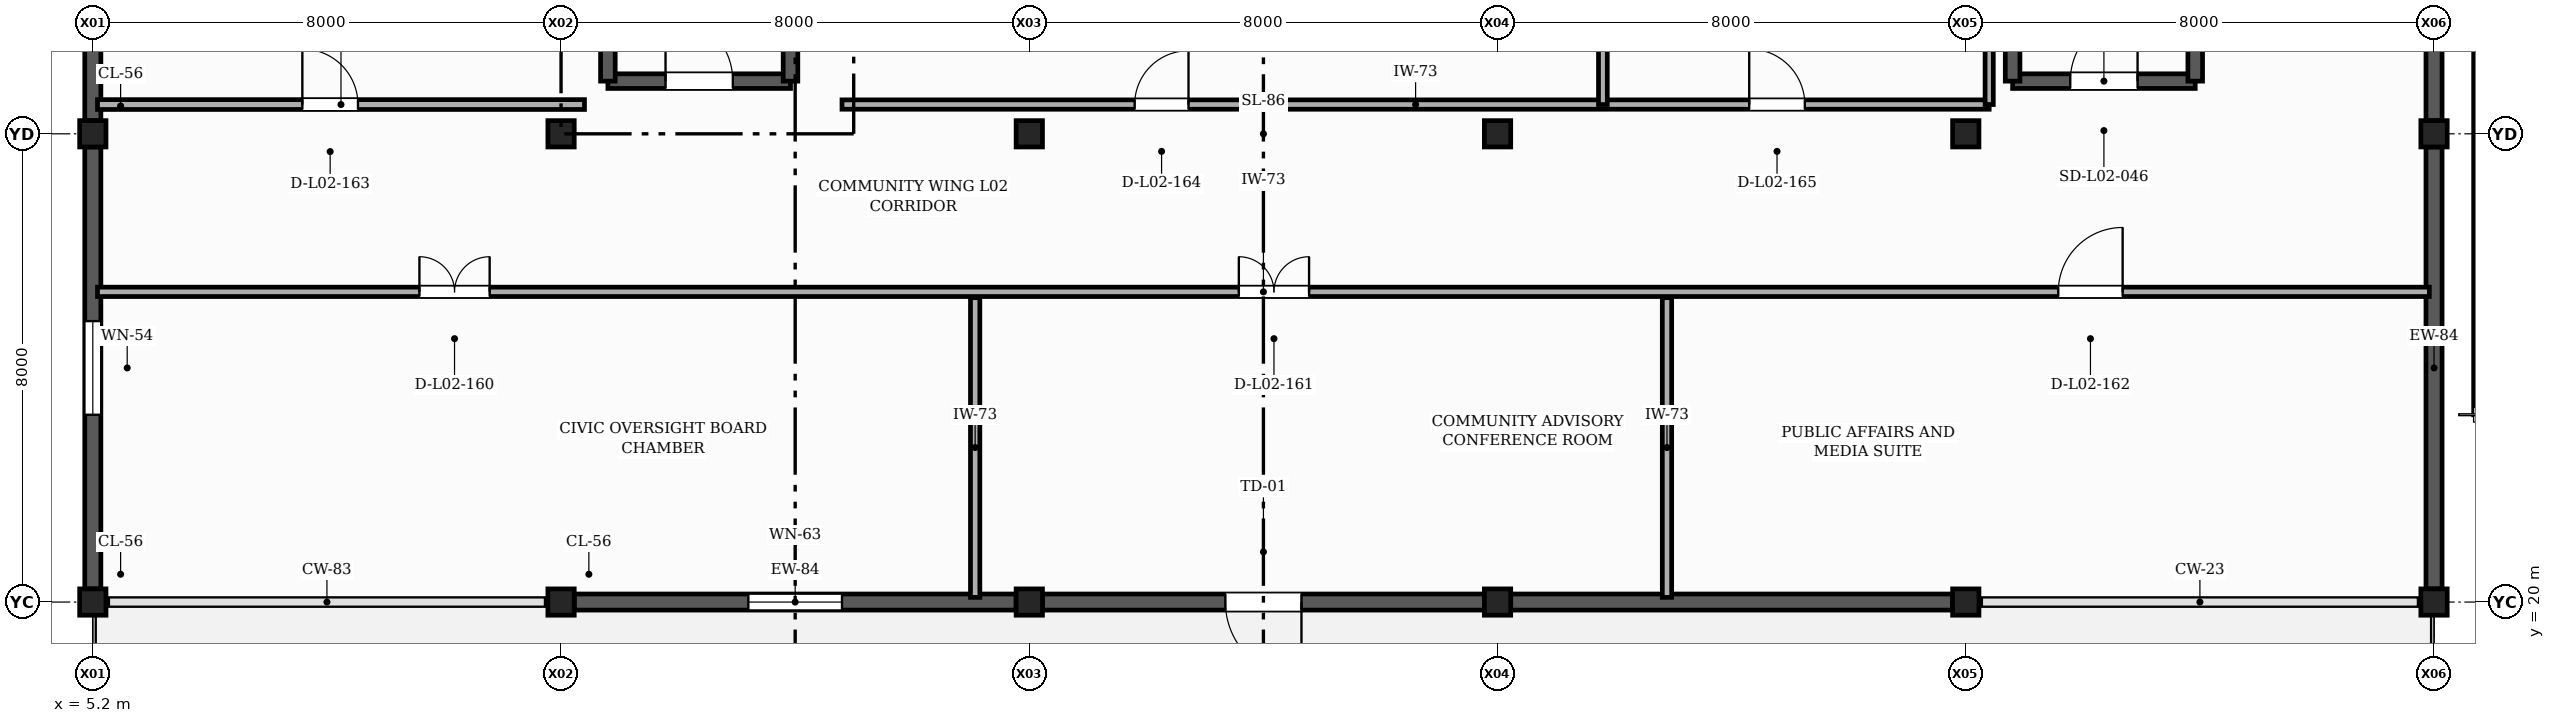
"""IFC4 building model, lengths in metres.
Left out: names, types, materials, properties, quantities, classifications, styles, units other than length and angle.
Written with IfcOpenShell. Run it as: python <this file> out.ifc"""

import sys

from ifc_helpers import new_model, si_unit, direction, frame, frame_2d, origin, origin_2d, place, context, subcontext, project, spatial, rectangle, extrude, element, fill, save


model = new_model("IFC4")
c1 = context("Model", 3, precision=1e-05, world=origin(), true_north=direction((0.0, 1.0)))
c2 = subcontext(c1, "Body", "Model", "MODEL_VIEW")
j1 = project(units=[si_unit("LENGTHUNIT", "METRE"), si_unit("PLANEANGLEUNIT", "RADIAN")], contexts=[c1])
p1 = place(None, origin())
s1 = spatial("IfcSite", under=j1, at=p1, CompositionType="ELEMENT")
p2 = place(p1, origin())
s2 = spatial("IfcBuilding", under=s1, at=p2, CompositionType="ELEMENT")
p3 = place(p2, frame((0.0, 0.0, 9.0)))
s3 = spatial("IfcBuildingStorey", under=s2, at=p3, CompositionType="ELEMENT", Elevation=9.0)
for number, where, z_axis, x_axis in (
    (1, (5.2, 20.0, 0.0), (0.0, 0.0, 1.0), (1.0, 0.0, 0.0)),
    (2, (5.2, 28.0, 0.0), (0.0, 0.0, 1.0), (1.0, 0.0, 0.0)),
    (3, (13.2, 20.0, 0.0), (0.0, 0.0, 1.0), (1.0, 0.0, 0.0)),
    (4, (13.2, 28.0, 0.0), (0.0, 0.0, 1.0), (1.0, 0.0, 0.0)),
    (5, (21.2, 20.0, 0.0), (0.0, 0.0, 1.0), (1.0, 0.0, 0.0)),
    (6, (21.2, 28.0, 0.0), (0.0, 0.0, 1.0), (1.0, 0.0, 0.0)),
    (7, (29.2, 20.0, 0.0), (0.0, 0.0, 1.0), (1.0, 0.0, 0.0)),
    (8, (29.2, 28.0, 0.0), (0.0, 0.0, 1.0), (1.0, 0.0, 0.0)),
    (9, (37.2, 20.0, 0.0), (0.0, 0.0, 1.0), (1.0, 0.0, 0.0)),
    (10, (37.2, 28.0, 0.0), (0.0, 0.0, 1.0), (1.0, 0.0, 0.0)),
    (11, (45.2, 20.0, 0.0), (0.0, 0.0, 1.0), (1.0, 0.0, 0.0)),
    (12, (45.2, 28.0, 0.0), (0.0, 0.0, 1.0), (1.0, 0.0, 0.0)),
):
    element("IfcColumn", number, at=place(p3, frame(where, z_axis=z_axis, x_axis=x_axis)), inside=s3, PredefinedType="COLUMN", context=c2, shape_type="SweptSolid", body=[
        extrude(rectangle(XDim=0.45, YDim=0.45, at=origin_2d()), origin(), (0.0, 0.0, 1.0), 4.5),
    ])
p4 = place(p3, frame((46.0, 35.575, 0.0), z_axis=(0.0, 0.0, 1.0), x_axis=(0.0, -1.0, 0.0)))
e13 = element("IfcWall", 13, at=p4, inside=s3, PredefinedType="SOLIDWALL", context=c2, shape_type="SweptSolid", body=[
    extrude(rectangle(XDim=12.375, YDim=0.245, at=frame_2d((6.188, 0.0))), origin(), (0.0, 0.0, 1.0), 3.22),
])
p5 = place(p3, frame((13.425, 20.0, 0.0), z_axis=(0.0, 0.0, 1.0), x_axis=(1.0, 0.0, 0.0)))
e14 = element("IfcWall", 14, at=p5, inside=s3, PredefinedType="SOLIDWALL", context=c2, shape_type="SweptSolid", body=[
    extrude(rectangle(XDim=7.55, YDim=0.275, at=frame_2d((3.775, 0.0))), origin(), (0.0, 0.0, 1.0), 3.57),
])
p6 = place(p5, frame((2.975, 0.0, 0.9)))
e15 = element("IfcOpeningElement", 15, at=p6, cuts=e14, PredefinedType="OPENING", context=c2, shape_type="SweptSolid", body=[
    extrude(rectangle(XDim=1.6, YDim=1.25, at=frame_2d((0.8, 0.625))), frame((0.0, 0.147, 0.0), z_axis=(0.0, -1.0, 0.0), x_axis=(1.0, 0.0, 0.0)), (0.0, 0.0, 1.0), 0.295),
])
p7 = place(p3, frame((21.425, 20.0, 0.0), z_axis=(0.0, 0.0, 1.0), x_axis=(1.0, 0.0, 0.0)))
e16 = element("IfcWall", 16, at=p7, inside=s3, PredefinedType="SOLIDWALL", context=c2, shape_type="SweptSolid", body=[
    extrude(rectangle(XDim=7.55, YDim=0.275, at=frame_2d((3.775, 0.0))), origin(), (0.0, 0.0, 1.0), 3.57),
])
p8 = place(p7, frame((3.125, 0.0, 0.0)))
e17 = element("IfcOpeningElement", 17, at=p8, cuts=e16, PredefinedType="OPENING", context=c2, shape_type="SweptSolid", body=[
    extrude(rectangle(XDim=1.3, YDim=2.2, at=frame_2d((0.65, 1.1))), frame((0.0, 0.147, 0.0), z_axis=(0.0, -1.0, 0.0), x_axis=(1.0, 0.0, 0.0)), (0.0, 0.0, 1.0), 0.295),
])
p9 = place(p3, frame((29.425, 20.0, 0.0), z_axis=(0.0, 0.0, 1.0), x_axis=(1.0, 0.0, 0.0)))
e18 = element("IfcWall", 18, at=p9, inside=s3, PredefinedType="SOLIDWALL", context=c2, shape_type="SweptSolid", body=[
    extrude(rectangle(XDim=7.55, YDim=0.275, at=frame_2d((3.775, 0.0))), origin(), (0.0, 0.0, 1.0), 3.57),
])
for number, where, z_axis, x_axis in (
    (19, (45.2, 20.225, 0.0), (0.0, 0.0, 1.0), (0.0, 1.0, 0.0)),
    (20, (45.2, 28.225, 0.0), (0.0, 0.0, 1.0), (0.0, 1.0, 0.0)),
):
    element("IfcWall", number, at=place(p3, frame(where, z_axis=z_axis, x_axis=x_axis)), inside=s3, PredefinedType="SOLIDWALL", context=c2, shape_type="SweptSolid", body=[
        extrude(rectangle(XDim=7.55, YDim=0.275, at=frame_2d((3.775, 0.0))), origin(), (0.0, 0.0, 1.0), 3.57),
    ])
p10 = place(p3, frame((5.2, 35.775, 0.0), z_axis=(0.0, 0.0, 1.0), x_axis=(0.0, -1.0, 0.0)))
e21 = element("IfcWall", 21, at=p10, inside=s3, PredefinedType="SOLIDWALL", context=c2, shape_type="SweptSolid", body=[
    extrude(rectangle(XDim=7.55, YDim=0.275, at=frame_2d((3.775, 0.0))), origin(), (0.0, 0.0, 1.0), 3.57),
])
p11 = place(p10, frame((2.975, 0.0, 0.9)))
e22 = element("IfcOpeningElement", 22, at=p11, cuts=e21, PredefinedType="OPENING", context=c2, shape_type="SweptSolid", body=[
    extrude(rectangle(XDim=1.6, YDim=2.1, at=frame_2d((0.8, 1.05))), frame((0.0, 0.147, 0.0), z_axis=(0.0, -1.0, 0.0), x_axis=(1.0, 0.0, 0.0)), (0.0, 0.0, 1.0), 0.295),
])
p12 = place(p3, frame((5.2, 27.775, 0.0), z_axis=(0.0, 0.0, 1.0), x_axis=(0.0, -1.0, 0.0)))
e23 = element("IfcWall", 23, at=p12, inside=s3, PredefinedType="SOLIDWALL", context=c2, shape_type="SweptSolid", body=[
    extrude(rectangle(XDim=7.55, YDim=0.275, at=frame_2d((3.775, 0.0))), origin(), (0.0, 0.0, 1.0), 3.57),
])
p13 = place(p12, frame((2.975, 0.0, 0.9)))
e24 = element("IfcOpeningElement", 24, at=p13, cuts=e23, PredefinedType="OPENING", context=c2, shape_type="SweptSolid", body=[
    extrude(rectangle(XDim=1.6, YDim=2.1, at=frame_2d((0.8, 1.05))), frame((0.0, 0.147, 0.0), z_axis=(0.0, -1.0, 0.0), x_axis=(1.0, 0.0, 0.0)), (0.0, 0.0, 1.0), 0.295),
])
p14 = place(p3, frame((14.0, 28.9, 0.0), z_axis=(0.0, 0.0, 1.0), x_axis=(1.0, 0.0, 0.0)))
e25 = element("IfcWall", 25, at=p14, inside=s3, PredefinedType="SHEAR", context=c2, shape_type="SweptSolid", body=[
    extrude(rectangle(XDim=3.12, YDim=0.25, at=frame_2d((1.56, 0.0))), origin(), (0.0, 0.0, 1.0), 4.5),
])
p15 = place(p14, frame((0.985, 0.0, 0.0)))
e26 = element("IfcOpeningElement", 26, at=p15, cuts=e25, PredefinedType="OPENING", context=c2, shape_type="SweptSolid", body=[
    extrude(rectangle(XDim=1.15, YDim=2.15, at=frame_2d((0.575, 1.075))), frame((0.0, 0.135, 0.0), z_axis=(0.0, -1.0, 0.0), x_axis=(1.0, 0.0, 0.0)), (0.0, 0.0, 1.0), 0.27),
])
for number, where, z_axis, x_axis in (
    (27, (17.12, 28.9, 0.0), (0.0, 0.0, 1.0), (0.0, 1.0, 0.0)),
    (28, (14.0, 36.0, 0.0), (0.0, 0.0, 1.0), (0.0, -1.0, 0.0)),
):
    element("IfcWall", number, at=place(p3, frame(where, z_axis=z_axis, x_axis=x_axis)), inside=s3, PredefinedType="SHEAR", context=c2, shape_type="SweptSolid", body=[
        extrude(rectangle(XDim=7.1, YDim=0.25, at=frame_2d((3.55, 0.0))), origin(), (0.0, 0.0, 1.0), 4.5),
    ])
p16 = place(p3, frame((38.0, 28.9, 0.0), z_axis=(0.0, 0.0, 1.0), x_axis=(1.0, 0.0, 0.0)))
e29 = element("IfcWall", 29, at=p16, inside=s3, PredefinedType="SHEAR", context=c2, shape_type="SweptSolid", body=[
    extrude(rectangle(XDim=3.12, YDim=0.25, at=frame_2d((1.56, 0.0))), origin(), (0.0, 0.0, 1.0), 4.5),
])
p17 = place(p16, frame((0.985, 0.0, 0.0)))
e30 = element("IfcOpeningElement", 30, at=p17, cuts=e29, PredefinedType="OPENING", context=c2, shape_type="SweptSolid", body=[
    extrude(rectangle(XDim=1.15, YDim=2.15, at=frame_2d((0.575, 1.075))), frame((0.0, 0.135, 0.0), z_axis=(0.0, -1.0, 0.0), x_axis=(1.0, 0.0, 0.0)), (0.0, 0.0, 1.0), 0.27),
])
for number, where, z_axis, x_axis in (
    (31, (41.12, 28.9, 0.0), (0.0, 0.0, 1.0), (0.0, 1.0, 0.0)),
    (32, (38.0, 36.0, 0.0), (0.0, 0.0, 1.0), (0.0, -1.0, 0.0)),
):
    element("IfcWall", number, at=place(p3, frame(where, z_axis=z_axis, x_axis=x_axis)), inside=s3, PredefinedType="SHEAR", context=c2, shape_type="SweptSolid", body=[
        extrude(rectangle(XDim=7.1, YDim=0.25, at=frame_2d((3.55, 0.0))), origin(), (0.0, 0.0, 1.0), 4.5),
    ])
for number, where, z_axis, x_axis in (
    (33, (20.275, 20.08, 0.0), (0.0, 0.0, 1.0), (0.0, 1.0, 0.0)),
    (34, (32.095, 20.08, 0.0), (0.0, 0.0, 1.0), (0.0, 1.0, 0.0)),
):
    element("IfcWall", number, at=place(p3, frame(where, z_axis=z_axis, x_axis=x_axis)), inside=s3, PredefinedType="PARTITIONING", context=c2, shape_type="SweptSolid", body=[
        extrude(rectangle(XDim=5.12, YDim=0.16, at=frame_2d((2.56, 0.0))), origin(), (0.0, 0.0, 1.0), 3.555),
    ])
p18 = place(p3, frame((5.28, 25.3, 0.0), z_axis=(0.0, 0.0, 1.0), x_axis=(1.0, 0.0, 0.0)))
e35 = element("IfcWall", 35, at=p18, inside=s3, PredefinedType="PARTITIONING", context=c2, shape_type="SweptSolid", body=[
    extrude(rectangle(XDim=39.84, YDim=0.16, at=frame_2d((19.92, 0.0))), origin(), (0.0, 0.0, 1.0), 3.455),
])
p19 = place(p18, frame((5.5, 0.0, 0.0)))
e36 = element("IfcOpeningElement", 36, at=p19, cuts=e35, PredefinedType="OPENING", context=c2, shape_type="SweptSolid", body=[
    extrude(rectangle(XDim=1.2, YDim=2.2, at=frame_2d((0.6, 1.1))), frame((0.0, 0.09, 0.0), z_axis=(0.0, -1.0, 0.0), x_axis=(1.0, 0.0, 0.0)), (0.0, 0.0, 1.0), 0.18),
])
p20 = place(p18, frame((19.5, 0.0, 0.0)))
e37 = element("IfcOpeningElement", 37, at=p20, cuts=e35, PredefinedType="OPENING", context=c2, shape_type="SweptSolid", body=[
    extrude(rectangle(XDim=1.2, YDim=2.2, at=frame_2d((0.6, 1.1))), frame((0.0, 0.09, 0.0), z_axis=(0.0, -1.0, 0.0), x_axis=(1.0, 0.0, 0.0)), (0.0, 0.0, 1.0), 0.18),
])
p21 = place(p18, frame((33.5, 0.0, 0.0)))
e38 = element("IfcOpeningElement", 38, at=p21, cuts=e35, PredefinedType="OPENING", context=c2, shape_type="SweptSolid", body=[
    extrude(rectangle(XDim=1.1, YDim=2.1, at=frame_2d((0.55, 1.05))), frame((0.0, 0.09, 0.0), z_axis=(0.0, -1.0, 0.0), x_axis=(1.0, 0.0, 0.0)), (0.0, 0.0, 1.0), 0.18),
])
p22 = place(p3, frame((5.28, 28.5, 0.0), z_axis=(0.0, 0.0, 1.0), x_axis=(1.0, 0.0, 0.0)))
e39 = element("IfcWall", 39, at=p22, inside=s3, PredefinedType="PARTITIONING", context=c2, shape_type="SweptSolid", body=[
    extrude(rectangle(XDim=8.32, YDim=0.168, at=frame_2d((4.16, 0.0))), origin(), (0.0, 0.0, 1.0), 3.555),
])
p23 = place(p22, frame((3.5, 0.0, 0.0)))
e40 = element("IfcOpeningElement", 40, at=p23, cuts=e39, PredefinedType="OPENING", context=c2, shape_type="SweptSolid", body=[
    extrude(rectangle(XDim=0.95, YDim=2.1, at=frame_2d((0.475, 1.05))), frame((0.0, 0.094, 0.0), z_axis=(0.0, -1.0, 0.0), x_axis=(1.0, 0.0, 0.0)), (0.0, 0.0, 1.0), 0.188),
])
p24 = place(p3, frame((18.0, 28.5, 0.0), z_axis=(0.0, 0.0, 1.0), x_axis=(1.0, 0.0, 0.0)))
e41 = element("IfcWall", 41, at=p24, inside=s3, PredefinedType="PARTITIONING", context=c2, shape_type="SweptSolid", body=[
    extrude(rectangle(XDim=19.6, YDim=0.16, at=frame_2d((9.8, 0.0))), origin(), (0.0, 0.0, 1.0), 3.555),
])
p25 = place(p24, frame((5.0, 0.0, 0.0)))
e42 = element("IfcOpeningElement", 42, at=p25, cuts=e41, PredefinedType="OPENING", context=c2, shape_type="SweptSolid", body=[
    extrude(rectangle(XDim=0.92, YDim=2.1, at=frame_2d((0.46, 1.05))), frame((0.0, 0.09, 0.0), z_axis=(0.0, -1.0, 0.0), x_axis=(1.0, 0.0, 0.0)), (0.0, 0.0, 1.0), 0.18),
])
p26 = place(p24, frame((15.5, 0.0, 0.0)))
e43 = element("IfcOpeningElement", 43, at=p26, cuts=e41, PredefinedType="OPENING", context=c2, shape_type="SweptSolid", body=[
    extrude(rectangle(XDim=0.95, YDim=2.15, at=frame_2d((0.475, 1.075))), frame((0.0, 0.09, 0.0), z_axis=(0.0, -1.0, 0.0), x_axis=(1.0, 0.0, 0.0)), (0.0, 0.0, 1.0), 0.18),
])
p27 = place(p3, frame((31.0, 28.5, 0.0), z_axis=(0.0, 0.0, 1.0), x_axis=(0.0, 1.0, 0.0)))
e44 = element("IfcWall", 44, at=p27, inside=s3, PredefinedType="PARTITIONING", context=c2, shape_type="SweptSolid", body=[
    extrude(rectangle(XDim=7.5, YDim=0.15, at=frame_2d((3.75, 0.0))), origin(), (0.0, 0.0, 1.0), 3.555),
])
p28 = place(p3, frame((37.6, 28.5, 0.0), z_axis=(0.0, 0.0, 1.0), x_axis=(0.0, 1.0, 0.0)))
e45 = element("IfcWall", 45, at=p28, inside=s3, PredefinedType="PARTITIONING", context=c2, shape_type="SweptSolid", body=[
    extrude(rectangle(XDim=7.5, YDim=0.14, at=frame_2d((3.75, 0.0))), origin(), (0.0, 0.0, 1.0), 4.22),
])
p29 = place(p8, frame((1.3, 0.0, 0.0), z_axis=(0.0, 0.0, 1.0), x_axis=(-1.0, 0.0, 0.0)))
e46 = element("IfcDoor", 46, at=p29, inside=s3, OperationType="SINGLE_SWING_LEFT", PredefinedType="DOOR", context=c2, shape_type="SweptSolid", body=[
    extrude(rectangle(XDim=1.3, YDim=2.2, at=frame_2d((0.65, 1.1))), frame((0.0, 0.025, 0.0), z_axis=(0.0, -1.0, 0.0), x_axis=(1.0, 0.0, 0.0)), (0.0, 0.0, 1.0), 0.05),
])
fill(e17, e46)
p30 = place(p6, origin())
e47 = element("IfcWindow", 47, at=p30, inside=s3, PartitioningType="SINGLE_PANEL", PredefinedType="WINDOW", context=c2, shape_type="SweptSolid", body=[
    extrude(rectangle(XDim=1.6, YDim=1.25, at=frame_2d((0.8, 0.625))), frame((0.0, 0.03, 0.0), z_axis=(0.0, -1.0, 0.0), x_axis=(1.0, 0.0, 0.0)), (0.0, 0.0, 1.0), 0.06),
])
fill(e15, e47)
p31 = place(p13, origin())
e48 = element("IfcWindow", 48, at=p31, inside=s3, PartitioningType="SINGLE_PANEL", PredefinedType="WINDOW", context=c2, shape_type="SweptSolid", body=[
    extrude(rectangle(XDim=1.6, YDim=2.1, at=frame_2d((0.8, 1.05))), frame((0.0, 0.03, 0.0), z_axis=(0.0, -1.0, 0.0), x_axis=(1.0, 0.0, 0.0)), (0.0, 0.0, 1.0), 0.06),
])
fill(e24, e48)
p32 = place(p15, origin())
e49 = element("IfcDoor", 49, at=p32, inside=s3, OperationType="SINGLE_SWING_LEFT", PredefinedType="DOOR", context=c2, shape_type="SweptSolid", body=[
    extrude(rectangle(XDim=1.15, YDim=2.15, at=frame_2d((0.575, 1.075))), frame((0.0, 0.025, 0.0), z_axis=(0.0, -1.0, 0.0), x_axis=(1.0, 0.0, 0.0)), (0.0, 0.0, 1.0), 0.05),
])
fill(e26, e49)
p33 = place(p17, origin())
e50 = element("IfcDoor", 50, at=p33, inside=s3, OperationType="SINGLE_SWING_RIGHT", PredefinedType="DOOR", context=c2, shape_type="SweptSolid", body=[
    extrude(rectangle(XDim=1.15, YDim=2.15, at=frame_2d((0.575, 1.075))), frame((0.0, 0.025, 0.0), z_axis=(0.0, -1.0, 0.0), x_axis=(1.0, 0.0, 0.0)), (0.0, 0.0, 1.0), 0.05),
])
fill(e30, e50)
p34 = place(p19, origin())
e51 = element("IfcDoor", 51, at=p34, inside=s3, OperationType="DOUBLE_DOOR_SINGLE_SWING", PredefinedType="DOOR", context=c2, shape_type="SweptSolid", body=[
    extrude(rectangle(XDim=1.2, YDim=2.2, at=frame_2d((0.6, 1.1))), frame((0.0, 0.025, 0.0), z_axis=(0.0, -1.0, 0.0), x_axis=(1.0, 0.0, 0.0)), (0.0, 0.0, 1.0), 0.05),
])
fill(e36, e51)
p35 = place(p20, origin())
e52 = element("IfcDoor", 52, at=p35, inside=s3, OperationType="DOUBLE_DOOR_SINGLE_SWING", PredefinedType="DOOR", context=c2, shape_type="SweptSolid", body=[
    extrude(rectangle(XDim=1.2, YDim=2.2, at=frame_2d((0.6, 1.1))), frame((0.0, 0.025, 0.0), z_axis=(0.0, -1.0, 0.0), x_axis=(1.0, 0.0, 0.0)), (0.0, 0.0, 1.0), 0.05),
])
fill(e37, e52)
p36 = place(p21, origin())
e53 = element("IfcDoor", 53, at=p36, inside=s3, OperationType="SINGLE_SWING_RIGHT", PredefinedType="DOOR", context=c2, shape_type="SweptSolid", body=[
    extrude(rectangle(XDim=1.1, YDim=2.1, at=frame_2d((0.55, 1.05))), frame((0.0, 0.025, 0.0), z_axis=(0.0, -1.0, 0.0), x_axis=(1.0, 0.0, 0.0)), (0.0, 0.0, 1.0), 0.05),
])
fill(e38, e53)
p37 = place(p23, origin())
e54 = element("IfcDoor", 54, at=p37, inside=s3, OperationType="SINGLE_SWING_LEFT", PredefinedType="DOOR", context=c2, shape_type="SweptSolid", body=[
    extrude(rectangle(XDim=0.95, YDim=2.1, at=frame_2d((0.475, 1.05))), frame((0.0, 0.025, 0.0), z_axis=(0.0, -1.0, 0.0), x_axis=(1.0, 0.0, 0.0)), (0.0, 0.0, 1.0), 0.05),
])
fill(e40, e54)
p38 = place(p25, origin())
e55 = element("IfcDoor", 55, at=p38, inside=s3, OperationType="SINGLE_SWING_RIGHT", PredefinedType="DOOR", context=c2, shape_type="SweptSolid", body=[
    extrude(rectangle(XDim=0.92, YDim=2.1, at=frame_2d((0.46, 1.05))), frame((0.0, 0.025, 0.0), z_axis=(0.0, -1.0, 0.0), x_axis=(1.0, 0.0, 0.0)), (0.0, 0.0, 1.0), 0.05),
])
fill(e42, e55)
p39 = place(p26, origin())
e56 = element("IfcDoor", 56, at=p39, inside=s3, OperationType="SINGLE_SWING_LEFT", PredefinedType="DOOR", context=c2, shape_type="SweptSolid", body=[
    extrude(rectangle(XDim=0.95, YDim=2.15, at=frame_2d((0.475, 1.075))), frame((0.0, 0.025, 0.0), z_axis=(0.0, -1.0, 0.0), x_axis=(1.0, 0.0, 0.0)), (0.0, 0.0, 1.0), 0.05),
])
fill(e43, e56)
save(model, sys.argv[1])
